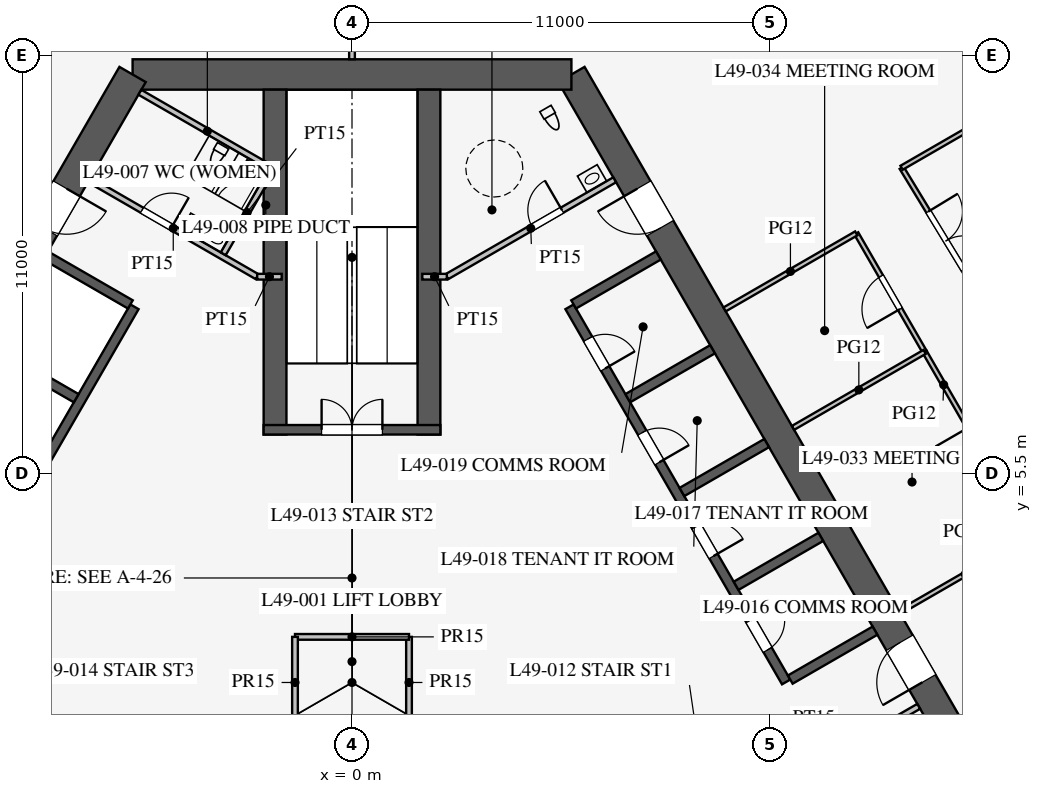
"""IFC4 building model, lengths in metres.
Left out: names, types, materials, properties, quantities, classifications, styles, units other than length and angle.
Written with IfcOpenShell. Run it as: python <this file> out.ifc"""

import sys

from ifc_helpers import new_model, si_unit, direction, frame, frame_2d, origin, place, context, subcontext, project, spatial, rectangle, extrude, element, fill, save


model = new_model("IFC4")
c1 = context("Model", 3, precision=1e-05, world=origin(), true_north=direction((0.0, 1.0)))
c2 = subcontext(c1, "Body", "Model", "MODEL_VIEW")
j1 = project(units=[si_unit("LENGTHUNIT", "METRE"), si_unit("PLANEANGLEUNIT", "RADIAN")], contexts=[c1])
p1 = place(None, origin())
s1 = spatial("IfcSite", under=j1, at=p1, CompositionType="ELEMENT")
p2 = place(p1, origin())
s2 = spatial("IfcBuilding", under=s1, at=p2, CompositionType="ELEMENT")
p3 = place(p2, frame((0.0, 0.0, 214.9)))
s3 = spatial("IfcBuildingStorey", under=s2, at=p3, CompositionType="ELEMENT", Elevation=214.9)
p4 = place(p3, frame((16.743, -3.0, 0.0), z_axis=(0.0, 0.0, 1.0), x_axis=(-0.500002442456, 0.866023993627, 0.0)))
e1 = element("IfcWall", 1, at=p4, inside=s3, PredefinedType="SHEAR", context=c2, shape_type="SweptSolid", body=[
    extrude(rectangle(XDim=21.939, YDim=0.8, at=frame_2d((10.97, 0.0))), origin(), (0.0, 0.0, 1.0), 4.2),
])
p5 = place(p4, frame((17.27, 0.0, 0.0)))
e2 = element("IfcOpeningElement", 2, at=p5, cuts=e1, PredefinedType="OPENING", context=c2, shape_type="SweptSolid", body=[
    extrude(rectangle(XDim=1.2, YDim=2.1, at=frame_2d((0.6, 1.05))), frame((0.0, 0.41, 0.0), z_axis=(0.0, -1.0, 0.0), x_axis=(1.0, 0.0, 0.0)), (0.0, 0.0, 1.0), 0.82),
])
p6 = place(p4, frame((3.47, 0.0, 0.0)))
e3 = element("IfcOpeningElement", 3, at=p6, cuts=e1, PredefinedType="OPENING", context=c2, shape_type="SweptSolid", body=[
    extrude(rectangle(XDim=1.2, YDim=2.1, at=frame_2d((0.6, 1.05))), frame((0.0, 0.41, 0.0), z_axis=(0.0, -1.0, 0.0), x_axis=(1.0, 0.0, 0.0)), (0.0, 0.0, 1.0), 0.82),
])
p7 = place(p3, frame((5.773, 16.0, 0.0), z_axis=(0.0, 0.0, 1.0), x_axis=(-1.0, 0.0, 0.0)))
e4 = element("IfcWall", 4, at=p7, inside=s3, PredefinedType="SHEAR", context=c2, shape_type="SweptSolid", body=[
    extrude(rectangle(XDim=11.547, YDim=0.8, at=frame_2d((5.773, 0.0))), origin(), (0.0, 0.0, 1.0), 4.2),
])
p8 = place(p3, frame((-5.773, 16.0, 0.0), z_axis=(0.0, 0.0, 1.0), x_axis=(-0.500002442456, -0.866023993627, 0.0)))
e5 = element("IfcWall", 5, at=p8, inside=s3, PredefinedType="SHEAR", context=c2, shape_type="SweptSolid", body=[
    extrude(rectangle(XDim=21.939, YDim=0.8, at=frame_2d((10.97, 0.0))), origin(), (0.0, 0.0, 1.0), 4.2),
])
p9 = place(p8, frame((17.27, 0.0, 0.0)))
e6 = element("IfcOpeningElement", 6, at=p9, cuts=e5, PredefinedType="OPENING", context=c2, shape_type="SweptSolid", body=[
    extrude(rectangle(XDim=1.2, YDim=2.1, at=frame_2d((0.6, 1.05))), frame((0.0, 0.41, 0.0), z_axis=(0.0, -1.0, 0.0), x_axis=(1.0, 0.0, 0.0)), (0.0, 0.0, 1.0), 0.82),
])
p10 = place(p8, frame((3.47, 0.0, 0.0)))
e7 = element("IfcOpeningElement", 7, at=p10, cuts=e5, PredefinedType="OPENING", context=c2, shape_type="SweptSolid", body=[
    extrude(rectangle(XDim=1.2, YDim=2.1, at=frame_2d((0.6, 1.05))), frame((0.0, 0.41, 0.0), z_axis=(0.0, -1.0, 0.0), x_axis=(1.0, 0.0, 0.0)), (0.0, 0.0, 1.0), 0.82),
])
p11 = place(p3, frame((11.424, 0.014, 0.0), z_axis=(0.0, 0.0, 1.0), x_axis=(-0.500001763848, 0.866024385424, 0.0)))
e8 = element("IfcWall", 8, at=p11, inside=s3, PredefinedType="SHEAR", context=c2, shape_type="SweptSolid", body=[
    extrude(rectangle(XDim=11.4, YDim=0.25, at=frame_2d((5.7, 0.0))), origin(), (0.0, 0.0, 1.0), 4.2),
])
p12 = place(p11, frame((0.975, 0.0, 0.0)))
e9 = element("IfcOpeningElement", 9, at=p12, cuts=e8, PredefinedType="OPENING", context=c2, shape_type="SweptSolid", body=[
    extrude(rectangle(XDim=0.9, YDim=2.1, at=frame_2d((0.45, 1.05))), frame((0.0, 0.135, 0.0), z_axis=(0.0, -1.0, 0.0), x_axis=(1.0, 0.0, 0.0)), (0.0, 0.0, 1.0), 0.27),
])
p13 = place(p11, frame((3.825, 0.0, 0.0)))
e10 = element("IfcOpeningElement", 10, at=p13, cuts=e8, PredefinedType="OPENING", context=c2, shape_type="SweptSolid", body=[
    extrude(rectangle(XDim=0.9, YDim=2.1, at=frame_2d((0.45, 1.05))), frame((0.0, 0.135, 0.0), z_axis=(0.0, -1.0, 0.0), x_axis=(1.0, 0.0, 0.0)), (0.0, 0.0, 1.0), 0.27),
])
p14 = place(p11, frame((6.675, 0.0, 0.0)))
e11 = element("IfcOpeningElement", 11, at=p14, cuts=e8, PredefinedType="OPENING", context=c2, shape_type="SweptSolid", body=[
    extrude(rectangle(XDim=0.9, YDim=2.1, at=frame_2d((0.45, 1.05))), frame((0.0, 0.135, 0.0), z_axis=(0.0, -1.0, 0.0), x_axis=(1.0, 0.0, 0.0)), (0.0, 0.0, 1.0), 0.27),
])
p15 = place(p11, frame((9.525, 0.0, 0.0)))
e12 = element("IfcOpeningElement", 12, at=p15, cuts=e8, PredefinedType="OPENING", context=c2, shape_type="SweptSolid", body=[
    extrude(rectangle(XDim=0.9, YDim=2.1, at=frame_2d((0.45, 1.05))), frame((0.0, 0.135, 0.0), z_axis=(0.0, -1.0, 0.0), x_axis=(1.0, 0.0, 0.0)), (0.0, 0.0, 1.0), 0.27),
])
for number, where, z_axis, x_axis in (
    (13, (11.532, 0.076, 0.0), (0.0, 0.0, 1.0), (0.866, 0.5, 0.0)),
    (14, (10.107, 2.544, 0.0), (0.0, 0.0, 1.0), (0.866, 0.5, 0.0)),
    (15, (8.682, 5.012, 0.0), (0.0, 0.0, 1.0), (0.866, 0.5, 0.0)),
    (16, (7.257, 7.481, 0.0), (0.0, 0.0, 1.0), (0.866, 0.5, 0.0)),
):
    element("IfcWall", number, at=place(p3, frame(where, z_axis=z_axis, x_axis=x_axis)), inside=s3, PredefinedType="SHEAR", context=c2, shape_type="SweptSolid", body=[
        extrude(rectangle(XDim=2.575, YDim=0.25, at=frame_2d((1.288, 0.0))), origin(), (0.0, 0.0, 1.0), 4.2),
    ])
p16 = place(p3, frame((5.832, 9.949, 0.0), z_axis=(0.0, 0.0, 1.0), x_axis=(0.866029291668, 0.499993265928, 0.0)))
e17 = element("IfcWall", 17, at=p16, inside=s3, PredefinedType="SHEAR", context=c2, shape_type="SweptSolid", body=[
    extrude(rectangle(XDim=2.575, YDim=0.25, at=frame_2d((1.288, 0.0))), origin(), (0.0, 0.0, 1.0), 4.2),
])
p17 = place(p3, frame((-5.724, 9.886, 0.0), z_axis=(0.0, 0.0, 1.0), x_axis=(-0.500001763848, -0.866024385424, 0.0)))
e18 = element("IfcWall", 18, at=p17, inside=s3, PredefinedType="SHEAR", context=c2, shape_type="SweptSolid", body=[
    extrude(rectangle(XDim=11.4, YDim=0.25, at=frame_2d((5.7, 0.0))), origin(), (0.0, 0.0, 1.0), 4.2),
])
p18 = place(p17, frame((6.525, 0.0, 0.0)))
e19 = element("IfcOpeningElement", 19, at=p18, cuts=e18, PredefinedType="OPENING", context=c2, shape_type="SweptSolid", body=[
    extrude(rectangle(XDim=1.2, YDim=2.2, at=frame_2d((0.6, 1.1))), frame((0.0, 0.135, 0.0), z_axis=(0.0, -1.0, 0.0), x_axis=(1.0, 0.0, 0.0)), (0.0, 0.0, 1.0), 0.27),
])
p19 = place(p17, frame((9.375, 0.0, 0.0)))
e20 = element("IfcOpeningElement", 20, at=p19, cuts=e18, PredefinedType="OPENING", context=c2, shape_type="SweptSolid", body=[
    extrude(rectangle(XDim=1.2, YDim=2.2, at=frame_2d((0.6, 1.1))), frame((0.0, 0.135, 0.0), z_axis=(0.0, -1.0, 0.0), x_axis=(1.0, 0.0, 0.0)), (0.0, 0.0, 1.0), 0.27),
])
p20 = place(p3, frame((-5.832, 9.949, 0.0), z_axis=(0.0, 0.0, 1.0), x_axis=(-0.866029291668, 0.499993265928, 0.0)))
e21 = element("IfcWall", 21, at=p20, inside=s3, PredefinedType="SHEAR", context=c2, shape_type="SweptSolid", body=[
    extrude(rectangle(XDim=2.575, YDim=0.25, at=frame_2d((1.288, 0.0))), origin(), (0.0, 0.0, 1.0), 4.2),
])
p21 = place(p3, frame((-7.257, 7.481, 0.0), z_axis=(0.0, 0.0, 1.0), x_axis=(-0.866046643894, 0.499963209246, 0.0)))
e22 = element("IfcWall", 22, at=p21, inside=s3, PredefinedType="SHEAR", context=c2, shape_type="SweptSolid", body=[
    extrude(rectangle(XDim=2.575, YDim=0.25, at=frame_2d((1.288, 0.0))), origin(), (0.0, 0.0, 1.0), 4.2),
])
for number, where, z_axis, x_axis in (
    (23, (2.025, 6.525, 0.0), (0.0, 0.0, 1.0), (0.0, 1.0, 0.0)),
    (24, (-2.025, 6.525, 0.0), (0.0, 0.0, 1.0), (0.0, 1.0, 0.0)),
):
    element("IfcWall", number, at=place(p3, frame(where, z_axis=z_axis, x_axis=x_axis)), inside=s3, PredefinedType="SHEAR", context=c2, shape_type="SweptSolid", body=[
        extrude(rectangle(XDim=9.075, YDim=0.6, at=frame_2d((4.538, 0.0))), origin(), (0.0, 0.0, 1.0), 4.2),
    ])
p22 = place(p3, frame((2.325, 6.65, 0.0), z_axis=(0.0, 0.0, 1.0), x_axis=(-1.0, 0.0, 0.0)))
e25 = element("IfcWall", 25, at=p22, inside=s3, PredefinedType="SHEAR", context=c2, shape_type="SweptSolid", body=[
    extrude(rectangle(XDim=4.65, YDim=0.25, at=frame_2d((2.325, 0.0))), origin(), (0.0, 0.0, 1.0), 4.2),
])
p23 = place(p22, frame((1.525, 0.0, 0.0)))
e26 = element("IfcOpeningElement", 26, at=p23, cuts=e25, PredefinedType="OPENING", context=c2, shape_type="SweptSolid", body=[
    extrude(rectangle(XDim=1.6, YDim=2.1, at=frame_2d((0.8, 1.05))), frame((0.0, 0.135, 0.0), z_axis=(0.0, -1.0, 0.0), x_axis=(1.0, 0.0, 0.0)), (0.0, 0.0, 1.0), 0.27),
])
p24 = place(p3, frame((2.495, 10.678, 0.0), z_axis=(0.0, 0.0, 1.0), x_axis=(0.86602216432, 0.500005610874, 0.0)))
e27 = element("IfcWall", 27, at=p24, inside=s3, PredefinedType="PARTITIONING", context=c2, shape_type="SweptSolid", body=[
    extrude(rectangle(XDim=5.1, YDim=0.15, at=frame_2d((2.55, 0.0))), origin(), (0.0, 0.0, 1.0), 4.0),
])
p25 = place(p24, frame((2.6, 0.0, 0.0)))
e28 = element("IfcOpeningElement", 28, at=p25, cuts=e27, PredefinedType="OPENING", context=c2, shape_type="SweptSolid", body=[
    extrude(rectangle(XDim=0.9, YDim=2.1, at=frame_2d((0.45, 1.05))), frame((0.0, 0.085, 0.0), z_axis=(0.0, -1.0, 0.0), x_axis=(1.0, 0.0, 0.0)), (0.0, 0.0, 1.0), 0.17),
])
p26 = place(p3, frame((10.495, -3.178, 0.0), z_axis=(0.0, 0.0, 1.0), x_axis=(0.86602216432, 0.500005610874, 0.0)))
e29 = element("IfcWall", 29, at=p26, inside=s3, PredefinedType="PARTITIONING", context=c2, shape_type="SweptSolid", body=[
    extrude(rectangle(XDim=5.1, YDim=0.15, at=frame_2d((2.55, 0.0))), origin(), (0.0, 0.0, 1.0), 4.0),
])
p27 = place(p26, frame((2.6, 0.0, 0.0)))
e30 = element("IfcOpeningElement", 30, at=p27, cuts=e29, PredefinedType="OPENING", context=c2, shape_type="SweptSolid", body=[
    extrude(rectangle(XDim=0.9, YDim=2.1, at=frame_2d((0.45, 1.05))), frame((0.0, 0.085, 0.0), z_axis=(0.0, -1.0, 0.0), x_axis=(1.0, 0.0, 0.0)), (0.0, 0.0, 1.0), 0.17),
])
p28 = place(p3, frame((-2.495, 10.678, 0.0), z_axis=(0.0, 0.0, 1.0), x_axis=(-0.86602216432, 0.500005610874, 0.0)))
e31 = element("IfcWall", 31, at=p28, inside=s3, PredefinedType="PARTITIONING", context=c2, shape_type="SweptSolid", body=[
    extrude(rectangle(XDim=5.1, YDim=0.15, at=frame_2d((2.55, 0.0))), origin(), (0.0, 0.0, 1.0), 4.0),
])
p29 = place(p28, frame((2.6, 0.0, 0.0)))
e32 = element("IfcOpeningElement", 32, at=p29, cuts=e31, PredefinedType="OPENING", context=c2, shape_type="SweptSolid", body=[
    extrude(rectangle(XDim=0.9, YDim=2.1, at=frame_2d((0.45, 1.05))), frame((0.0, 0.085, 0.0), z_axis=(0.0, -1.0, 0.0), x_axis=(1.0, 0.0, 0.0)), (0.0, 0.0, 1.0), 0.17),
])
for number, where, z_axis, x_axis in (
    (33, (2.495, 10.678, 0.0), (0.0, 0.0, 1.0), (-1.0, 0.0, 0.0)),
    (34, (-2.495, 10.678, 0.0), (0.0, 0.0, 1.0), (1.0, 0.0, 0.0)),
):
    element("IfcWall", number, at=place(p3, frame(where, z_axis=z_axis, x_axis=x_axis)), inside=s3, PredefinedType="PARTITIONING", context=c2, shape_type="SweptSolid", body=[
        extrude(rectangle(XDim=0.645, YDim=0.15, at=frame_2d((0.323, 0.0))), origin(), (0.0, 0.0, 1.0), 4.0),
    ])
p30 = place(p3, frame((-2.031, 13.482, 0.0), z_axis=(0.0, 0.0, 1.0), x_axis=(-0.866050731258, 0.499956128963, 0.0)))
e35 = element("IfcWall", 35, at=p30, inside=s3, PredefinedType="PARTITIONING", context=c2, shape_type="SweptSolid", body=[
    extrude(rectangle(XDim=4.1, YDim=0.15, at=frame_2d((2.05, 0.0))), origin(), (0.0, 0.0, 1.0), 4.0),
])
p31 = place(p3, frame((-3.389, 11.281, 0.0), z_axis=(0.0, 0.0, 1.0), x_axis=(0.499989096993, 0.866031698547, 0.0)))
e36 = element("IfcWall", 36, at=p31, inside=s3, PredefinedType="PARTITIONING", context=c2, shape_type="SweptSolid", body=[
    extrude(rectangle(XDim=2.51, YDim=0.15, at=frame_2d((1.255, 0.0))), origin(), (0.0, 0.0, 1.0), 4.0),
])
p32 = place(p3, frame((1.5, -1.2, 0.0), z_axis=(0.0, 0.0, 1.0), x_axis=(0.0, 1.0, 0.0)))
e37 = element("IfcWall", 37, at=p32, inside=s3, PredefinedType="PARTITIONING", context=c2, shape_type="SweptSolid", body=[
    extrude(rectangle(XDim=2.4, YDim=0.15, at=frame_2d((1.2, 0.0))), origin(), (0.0, 0.0, 1.0), 4.0),
])
p33 = place(p3, frame((1.5, 1.2, 0.0), z_axis=(0.0, 0.0, 1.0), x_axis=(-1.0, 0.0, 0.0)))
e38 = element("IfcWall", 38, at=p33, inside=s3, PredefinedType="PARTITIONING", context=c2, shape_type="SweptSolid", body=[
    extrude(rectangle(XDim=3.0, YDim=0.15, at=frame_2d((1.5, 0.0))), origin(), (0.0, 0.0, 1.0), 4.0),
])
p34 = place(p3, frame((-1.5, 1.2, 0.0), z_axis=(0.0, 0.0, 1.0), x_axis=(0.0, -1.0, 0.0)))
e39 = element("IfcWall", 39, at=p34, inside=s3, PredefinedType="PARTITIONING", context=c2, shape_type="SweptSolid", body=[
    extrude(rectangle(XDim=2.4, YDim=0.15, at=frame_2d((1.2, 0.0))), origin(), (0.0, 0.0, 1.0), 4.0),
])
p35 = place(p3, frame((0.0, 16.4, 0.0), z_axis=(0.0, 0.0, 1.0), x_axis=(0.0, 1.0, 0.0)))
e40 = element("IfcWall", 40, at=p35, inside=s3, PredefinedType="PARTITIONING", context=c2, shape_type="SweptSolid", body=[
    extrude(rectangle(XDim=14.95, YDim=0.15, at=frame_2d((7.475, 0.0))), origin(), (0.0, 0.0, 1.0), 2.4),
])
p36 = place(p3, frame((15.069, 8.7, 0.0), z_axis=(0.0, 0.0, 1.0), x_axis=(-0.500012057535, 0.866018442252, 0.0)))
e41 = element("IfcWall", 41, at=p36, inside=s3, PredefinedType="PARTITIONING", context=c2, shape_type="SweptSolid", body=[
    extrude(rectangle(XDim=3.6, YDim=0.12, at=frame_2d((1.8, 0.0))), origin(), (0.0, 0.0, 1.0), 2.9),
])
p37 = place(p36, frame((1.3, 0.0, 0.15)))
e42 = element("IfcOpeningElement", 42, at=p37, cuts=e41, PredefinedType="OPENING", context=c2, shape_type="SweptSolid", body=[
    extrude(rectangle(XDim=1.0, YDim=2.1, at=frame_2d((0.5, 1.05))), frame((0.0, 0.07, 0.0), z_axis=(0.0, -1.0, 0.0), x_axis=(1.0, 0.0, 0.0)), (0.0, 0.0, 1.0), 0.14),
])
p38 = place(p3, frame((17.869, 3.85, 0.0), z_axis=(0.0, 0.0, 1.0), x_axis=(-0.500016814911, 0.866015695474, 0.0)))
e43 = element("IfcWall", 43, at=p38, inside=s3, PredefinedType="PARTITIONING", context=c2, shape_type="SweptSolid", body=[
    extrude(rectangle(XDim=5.6, YDim=0.12, at=frame_2d((2.8, 0.0))), origin(), (0.0, 0.0, 1.0), 2.9),
])
p39 = place(p38, frame((2.3, 0.0, 0.15)))
e44 = element("IfcOpeningElement", 44, at=p39, cuts=e43, PredefinedType="OPENING", context=c2, shape_type="SweptSolid", body=[
    extrude(rectangle(XDim=1.0, YDim=2.1, at=frame_2d((0.5, 1.05))), frame((0.0, 0.07, 0.0), z_axis=(0.0, -1.0, 0.0), x_axis=(1.0, 0.0, 0.0)), (0.0, 0.0, 1.0), 0.14),
])
for number, where, z_axis, x_axis in (
    (45, (9.805, 9.818, 0.0), (0.0, 0.0, 1.0), (0.866, 0.5, 0.0)),
    (46, (11.605, 6.7, 0.0), (0.0, 0.0, 1.0), (0.866, 0.5, 0.0)),
    (47, (14.405, 1.85, 0.0), (0.0, 0.0, 1.0), (0.866, 0.5, 0.0)),
):
    element("IfcWall", number, at=place(p3, frame(where, z_axis=z_axis, x_axis=x_axis)), inside=s3, PredefinedType="PARTITIONING", context=c2, shape_type="SweptSolid", body=[
        extrude(rectangle(XDim=4.0, YDim=0.12, at=frame_2d((2.0, 0.0))), origin(), (0.0, 0.0, 1.0), 2.9),
    ])
p40 = place(p3, frame((16.802, 9.7, 0.0), z_axis=(0.0, 0.0, 1.0), x_axis=(-0.519790350351, 0.85429385558, 0.0)))
e48 = element("IfcWall", 48, at=p40, inside=s3, PredefinedType="PARTITIONING", context=c2, shape_type="SweptSolid", body=[
    extrude(rectangle(XDim=4.501, YDim=0.12, at=frame_2d((2.25, 0.0))), origin(), (0.0, 0.0, 1.0), 2.9),
])
p41 = place(p40, frame((1.35, 0.0, 0.15)))
e49 = element("IfcOpeningElement", 49, at=p41, cuts=e48, PredefinedType="OPENING", context=c2, shape_type="SweptSolid", body=[
    extrude(rectangle(XDim=1.8, YDim=2.1, at=frame_2d((0.9, 1.05))), frame((0.0, 0.07, 0.0), z_axis=(0.0, -1.0, 0.0), x_axis=(1.0, 0.0, 0.0)), (0.0, 0.0, 1.0), 0.14),
])
p42 = place(p3, frame((14.462, 13.546, 0.0), z_axis=(0.0, 0.0, 1.0), x_axis=(0.866016202281, 0.500015937133, 0.0)))
e50 = element("IfcWall", 50, at=p42, inside=s3, PredefinedType="PARTITIONING", context=c2, shape_type="SweptSolid", body=[
    extrude(rectangle(XDim=4.368, YDim=0.12, at=frame_2d((2.184, 0.0))), origin(), (0.0, 0.0, 1.0), 2.9),
])
p43 = place(p3, frame((-0.016, 30.491, 0.0), z_axis=(0.0, 0.0, 1.0), x_axis=(-0.50000091641, -0.866024874695, 0.0)))
e51 = element("IfcWall", 51, at=p43, inside=s3, PredefinedType="PARTITIONING", context=c2, shape_type="SweptSolid", body=[
    extrude(rectangle(XDim=52.796, YDim=0.12, at=frame_2d((26.398, 0.0))), origin(), (0.0, 0.0, 1.0), 2.9),
])
p44 = place(p43, frame((10.2, 0.0, 0.15)))
e52 = element("IfcOpeningElement", 52, at=p44, cuts=e51, PredefinedType="OPENING", context=c2, shape_type="SweptSolid", body=[
    extrude(rectangle(XDim=1.8, YDim=2.1, at=frame_2d((0.9, 1.05))), frame((0.0, 0.07, 0.0), z_axis=(0.0, -1.0, 0.0), x_axis=(1.0, 0.0, 0.0)), (0.0, 0.0, 1.0), 0.14),
])
p45 = place(p43, frame((40.8, 0.0, 0.15)))
e53 = element("IfcOpeningElement", 53, at=p45, cuts=e51, PredefinedType="OPENING", context=c2, shape_type="SweptSolid", body=[
    extrude(rectangle(XDim=1.8, YDim=2.1, at=frame_2d((0.9, 1.05))), frame((0.0, 0.07, 0.0), z_axis=(0.0, -1.0, 0.0), x_axis=(1.0, 0.0, 0.0)), (0.0, 0.0, 1.0), 0.14),
])
p46 = place(p25, origin())
e54 = element("IfcDoor", 54, at=p46, inside=s3, OperationType="SINGLE_SWING_RIGHT", PredefinedType="DOOR", context=c2, shape_type="SweptSolid", body=[
    extrude(rectangle(XDim=0.9, YDim=2.1, at=frame_2d((0.45, 1.05))), frame((0.0, 0.025, 0.0), z_axis=(0.0, -1.0, 0.0), x_axis=(1.0, 0.0, 0.0)), (0.0, 0.0, 1.0), 0.05),
])
fill(e28, e54)
p47 = place(p29, frame((0.9, 0.0, 0.0), z_axis=(0.0, 0.0, 1.0), x_axis=(-1.0, 0.0, 0.0)))
e55 = element("IfcDoor", 55, at=p47, inside=s3, OperationType="SINGLE_SWING_RIGHT", PredefinedType="DOOR", context=c2, shape_type="SweptSolid", body=[
    extrude(rectangle(XDim=0.9, YDim=2.1, at=frame_2d((0.45, 1.05))), frame((0.0, 0.025, 0.0), z_axis=(0.0, -1.0, 0.0), x_axis=(1.0, 0.0, 0.0)), (0.0, 0.0, 1.0), 0.05),
])
fill(e32, e55)
p48 = place(p23, frame((1.6, 0.0, 0.0), z_axis=(0.0, 0.0, 1.0), x_axis=(-1.0, 0.0, 0.0)))
e56 = element("IfcDoor", 56, at=p48, inside=s3, OperationType="DOUBLE_DOOR_SINGLE_SWING", PredefinedType="DOOR", context=c2, shape_type="SweptSolid", body=[
    extrude(rectangle(XDim=1.6, YDim=2.1, at=frame_2d((0.8, 1.05))), frame((0.0, 0.025, 0.0), z_axis=(0.0, -1.0, 0.0), x_axis=(1.0, 0.0, 0.0)), (0.0, 0.0, 1.0), 0.05),
])
fill(e26, e56)
p49 = place(p5, origin())
e57 = element("IfcDoor", 57, at=p49, inside=s3, OperationType="SINGLE_SWING_RIGHT", PredefinedType="DOOR", context=c2, shape_type="SweptSolid", body=[
    extrude(rectangle(XDim=1.2, YDim=2.1, at=frame_2d((0.6, 1.05))), frame((0.0, 0.025, 0.0), z_axis=(0.0, -1.0, 0.0), x_axis=(1.0, 0.0, 0.0)), (0.0, 0.0, 1.0), 0.05),
])
fill(e2, e57)
p50 = place(p6, origin())
e58 = element("IfcDoor", 58, at=p50, inside=s3, OperationType="SINGLE_SWING_LEFT", PredefinedType="DOOR", context=c2, shape_type="SweptSolid", body=[
    extrude(rectangle(XDim=1.2, YDim=2.1, at=frame_2d((0.6, 1.05))), frame((0.0, 0.025, 0.0), z_axis=(0.0, -1.0, 0.0), x_axis=(1.0, 0.0, 0.0)), (0.0, 0.0, 1.0), 0.05),
])
fill(e3, e58)
p51 = place(p10, origin())
e59 = element("IfcDoor", 59, at=p51, inside=s3, OperationType="SINGLE_SWING_LEFT", PredefinedType="DOOR", context=c2, shape_type="SweptSolid", body=[
    extrude(rectangle(XDim=1.2, YDim=2.1, at=frame_2d((0.6, 1.05))), frame((0.0, 0.025, 0.0), z_axis=(0.0, -1.0, 0.0), x_axis=(1.0, 0.0, 0.0)), (0.0, 0.0, 1.0), 0.05),
])
fill(e7, e59)
p52 = place(p12, frame((0.9, 0.0, 0.0), z_axis=(0.0, 0.0, 1.0), x_axis=(-1.0, 0.0, 0.0)))
e60 = element("IfcDoor", 60, at=p52, inside=s3, OperationType="SINGLE_SWING_LEFT", PredefinedType="DOOR", context=c2, shape_type="SweptSolid", body=[
    extrude(rectangle(XDim=0.9, YDim=2.1, at=frame_2d((0.45, 1.05))), frame((0.0, 0.025, 0.0), z_axis=(0.0, -1.0, 0.0), x_axis=(1.0, 0.0, 0.0)), (0.0, 0.0, 1.0), 0.05),
])
fill(e9, e60)
p53 = place(p13, frame((0.9, 0.0, 0.0), z_axis=(0.0, 0.0, 1.0), x_axis=(-1.0, 0.0, 0.0)))
e61 = element("IfcDoor", 61, at=p53, inside=s3, OperationType="SINGLE_SWING_RIGHT", PredefinedType="DOOR", context=c2, shape_type="SweptSolid", body=[
    extrude(rectangle(XDim=0.9, YDim=2.1, at=frame_2d((0.45, 1.05))), frame((0.0, 0.025, 0.0), z_axis=(0.0, -1.0, 0.0), x_axis=(1.0, 0.0, 0.0)), (0.0, 0.0, 1.0), 0.05),
])
fill(e10, e61)
p54 = place(p14, frame((0.9, 0.0, 0.0), z_axis=(0.0, 0.0, 1.0), x_axis=(-1.0, 0.0, 0.0)))
e62 = element("IfcDoor", 62, at=p54, inside=s3, OperationType="SINGLE_SWING_RIGHT", PredefinedType="DOOR", context=c2, shape_type="SweptSolid", body=[
    extrude(rectangle(XDim=0.9, YDim=2.1, at=frame_2d((0.45, 1.05))), frame((0.0, 0.025, 0.0), z_axis=(0.0, -1.0, 0.0), x_axis=(1.0, 0.0, 0.0)), (0.0, 0.0, 1.0), 0.05),
])
fill(e11, e62)
p55 = place(p15, frame((0.9, 0.0, 0.0), z_axis=(0.0, 0.0, 1.0), x_axis=(-1.0, 0.0, 0.0)))
e63 = element("IfcDoor", 63, at=p55, inside=s3, OperationType="SINGLE_SWING_RIGHT", PredefinedType="DOOR", context=c2, shape_type="SweptSolid", body=[
    extrude(rectangle(XDim=0.9, YDim=2.1, at=frame_2d((0.45, 1.05))), frame((0.0, 0.025, 0.0), z_axis=(0.0, -1.0, 0.0), x_axis=(1.0, 0.0, 0.0)), (0.0, 0.0, 1.0), 0.05),
])
fill(e12, e63)
p56 = place(p37, origin())
e64 = element("IfcDoor", 64, at=p56, inside=s3, OperationType="SINGLE_SWING_LEFT", PredefinedType="DOOR", context=c2, shape_type="SweptSolid", body=[
    extrude(rectangle(XDim=1.0, YDim=2.1, at=frame_2d((0.5, 1.05))), frame((0.0, 0.025, 0.0), z_axis=(0.0, -1.0, 0.0), x_axis=(1.0, 0.0, 0.0)), (0.0, 0.0, 1.0), 0.05),
])
fill(e42, e64)
p57 = place(p41, frame((1.8, 0.0, 0.0), z_axis=(0.0, 0.0, 1.0), x_axis=(-1.0, 0.0, 0.0)))
e65 = element("IfcDoor", 65, at=p57, inside=s3, OperationType="DOUBLE_DOOR_SINGLE_SWING", PredefinedType="DOOR", context=c2, shape_type="SweptSolid", body=[
    extrude(rectangle(XDim=1.8, YDim=2.1, at=frame_2d((0.9, 1.05))), frame((0.0, 0.025, 0.0), z_axis=(0.0, -1.0, 0.0), x_axis=(1.0, 0.0, 0.0)), (0.0, 0.0, 1.0), 0.05),
])
fill(e49, e65)
save(model, sys.argv[1])
